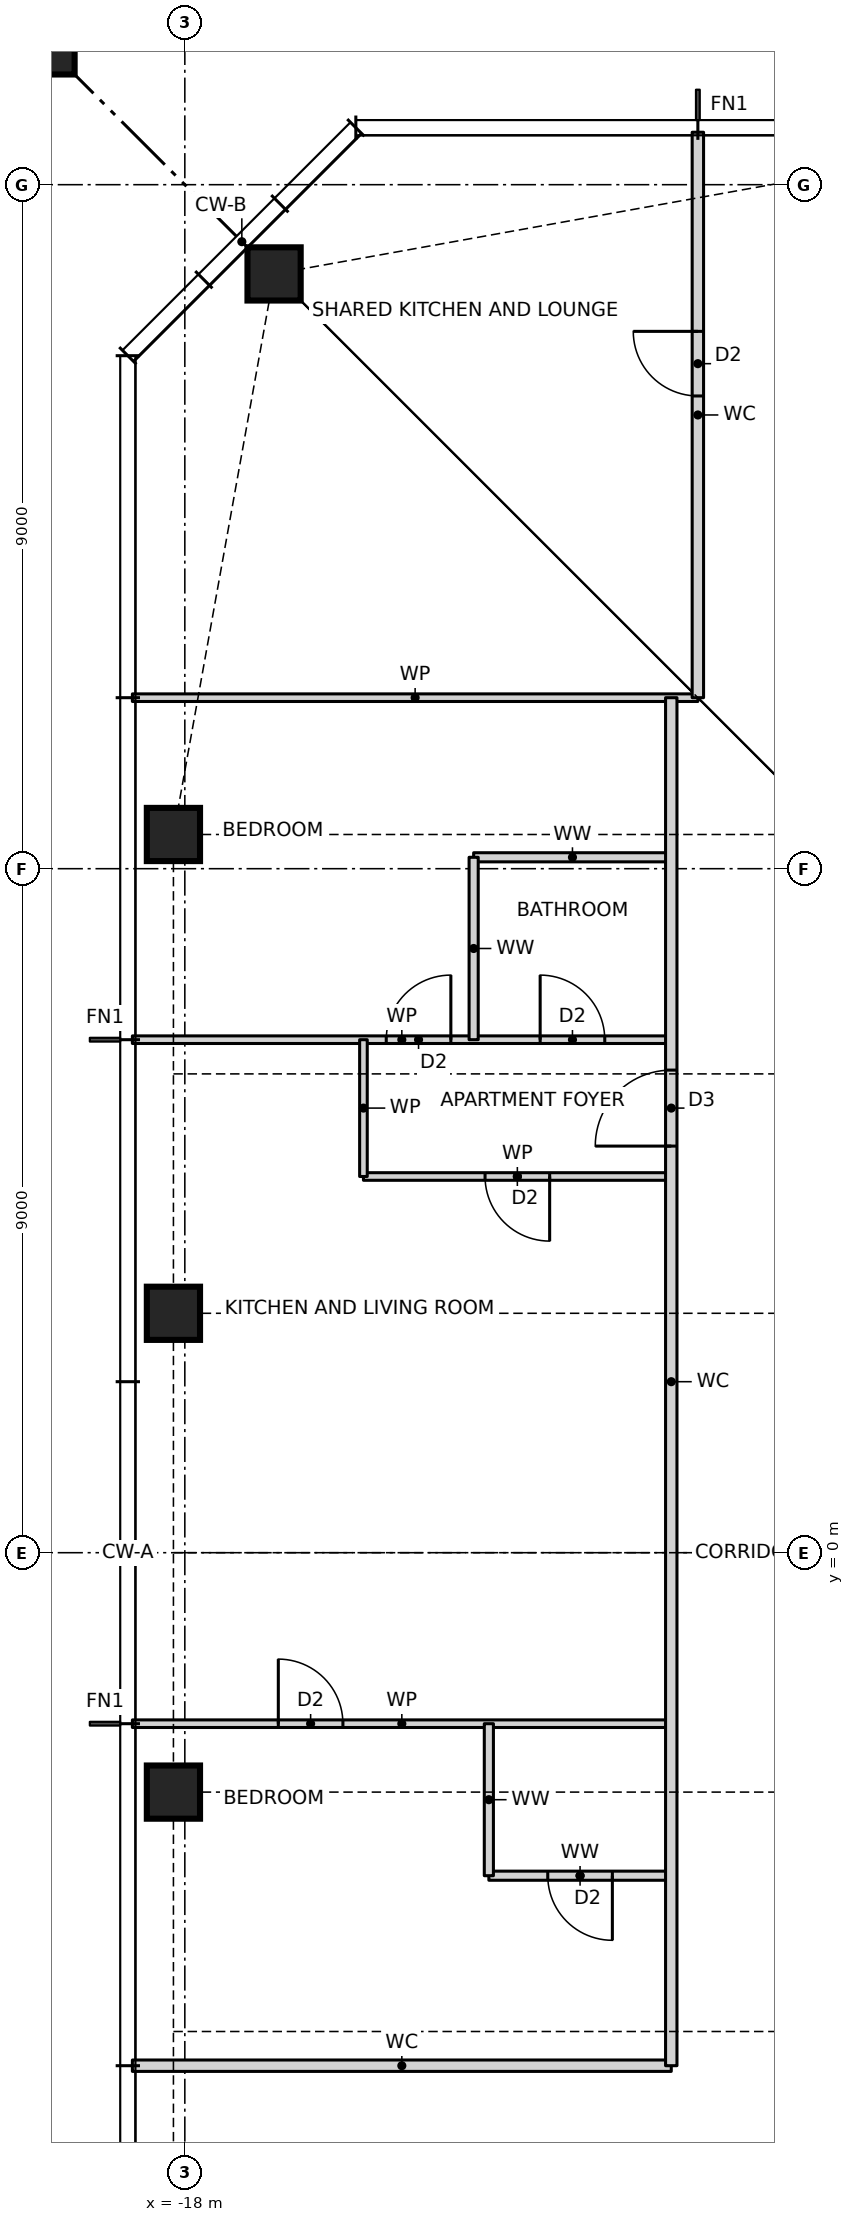
"""IFC4 building model, lengths in metres.
Left out: names, types, materials, properties, quantities, classifications, styles, units other than length and angle.
Written with IfcOpenShell. Run it as: python <this file> out.ifc"""

import sys

from ifc_helpers import new_model, si_unit, direction, frame, frame_2d, origin, origin_2d, place, context, subcontext, project, spatial, rectangle, hollow_rectangle, i_section, extrude, element, fill, save


model = new_model("IFC4")
c1 = context("Model", 3, precision=1e-05, world=origin(), true_north=direction((0.0, 1.0)))
c2 = subcontext(c1, "Body", "Model", "MODEL_VIEW")
j1 = project(units=[si_unit("LENGTHUNIT", "METRE"), si_unit("PLANEANGLEUNIT", "RADIAN")], contexts=[c1])
p1 = place(None, origin())
s1 = spatial("IfcSite", under=j1, at=p1, CompositionType="ELEMENT")
p2 = place(p1, origin())
s2 = spatial("IfcBuilding", under=s1, at=p2, CompositionType="ELEMENT")
p3 = place(p2, frame((0.0, 0.0, 174.0)))
s3 = spatial("IfcBuildingStorey", under=s2, at=p3, CompositionType="ELEMENT", Elevation=174.0)
for number, where, z_axis, x_axis in (
    (1, (-16.826, 16.826, 0.0), (0.0, 0.0, 1.0), (1.0, 0.0, 0.0)),
    (2, (-18.15, 9.45, 0.0), (0.0, 0.0, 1.0), (1.0, 0.0, 0.0)),
    (3, (-18.15, 3.15, 0.0), (0.0, 0.0, 1.0), (1.0, 0.0, 0.0)),
    (4, (-18.15, -3.15, 0.0), (0.0, 0.0, 1.0), (1.0, 0.0, 0.0)),
):
    element("IfcColumn", number, at=place(p3, frame(where, z_axis=z_axis, x_axis=x_axis)), inside=s3, PredefinedType="COLUMN", context=c2, shape_type="SweptSolid", body=[
        extrude(hollow_rectangle(XDim=0.7, YDim=0.7, WallThickness=0.06, at=origin_2d()), origin(), (0.0, 0.0, 1.0), 3.5),
    ])
p4 = place(p3, frame((-21.65, 21.65, 0.0), z_axis=(0.0, 0.0, 1.0), x_axis=(1.0, 0.0, 0.0)))
e5 = element("IfcColumn", 5, at=p4, inside=s3, PredefinedType="COLUMN", context=c2, shape_type="SweptSolid", body=[
    extrude(rectangle(XDim=4.4, YDim=4.4, at=origin_2d()), origin(), (0.0, 0.0, 1.0), 3.5),
    extrude(i_section(OverallWidth=0.478, OverallDepth=0.599, WebThickness=0.1, FlangeThickness=0.14, at=origin_2d()), origin(), (0.0, 0.0, 1.0), 3.5),
])
p5 = place(p3, frame((-18.69, -6.75, 0.0), z_axis=(0.0, 0.0, 1.0), x_axis=(1.0, 0.0, 0.0)))
e6 = element("IfcWall", 6, at=p5, inside=s3, PredefinedType="PARTITIONING", context=c2, shape_type="SweptSolid", body=[
    extrude(rectangle(XDim=7.09, YDim=0.15, at=frame_2d((3.545, 0.0))), origin(), (0.0, 0.0, 1.0), 3.27),
])
p6 = place(p3, frame((-14.0, -4.25, 0.0), z_axis=(0.0, 0.0, 1.0), x_axis=(1.0, 0.0, 0.0)))
e7 = element("IfcWall", 7, at=p6, inside=s3, PredefinedType="PARTITIONING", context=c2, shape_type="SweptSolid", body=[
    extrude(rectangle(XDim=2.4, YDim=0.12, at=frame_2d((1.2, 0.0))), origin(), (0.0, 0.0, 1.0), 3.27),
])
p7 = place(p6, frame((0.775, 0.0, 0.0)))
e8 = element("IfcOpeningElement", 8, at=p7, cuts=e7, PredefinedType="OPENING", context=c2, shape_type="SweptSolid", body=[
    extrude(rectangle(XDim=0.85, YDim=2.1, at=frame_2d((0.425, 1.05))), frame((0.0, 0.07, 0.0), z_axis=(0.0, -1.0, 0.0), x_axis=(1.0, 0.0, 0.0)), (0.0, 0.0, 1.0), 0.14),
])
p8 = place(p3, frame((-18.69, -2.25, 0.0), z_axis=(0.0, 0.0, 1.0), x_axis=(1.0, 0.0, 0.0)))
e9 = element("IfcWall", 9, at=p8, inside=s3, PredefinedType="PARTITIONING", context=c2, shape_type="SweptSolid", body=[
    extrude(rectangle(XDim=7.09, YDim=0.1, at=frame_2d((3.545, 0.0))), origin(), (0.0, 0.0, 1.0), 3.27),
])
p9 = place(p8, frame((1.92, 0.0, 0.0)))
e10 = element("IfcOpeningElement", 10, at=p9, cuts=e9, PredefinedType="OPENING", context=c2, shape_type="SweptSolid", body=[
    extrude(rectangle(XDim=0.85, YDim=2.1, at=frame_2d((0.425, 1.05))), frame((0.0, 0.06, 0.0), z_axis=(0.0, -1.0, 0.0), x_axis=(1.0, 0.0, 0.0)), (0.0, 0.0, 1.0), 0.12),
])
p10 = place(p3, frame((-15.65, 4.95, 0.0), z_axis=(0.0, 0.0, 1.0), x_axis=(1.0, 0.0, 0.0)))
e11 = element("IfcWall", 11, at=p10, inside=s3, PredefinedType="PARTITIONING", context=c2, shape_type="SweptSolid", body=[
    extrude(rectangle(XDim=4.05, YDim=0.1, at=frame_2d((2.025, 0.0))), origin(), (0.0, 0.0, 1.0), 3.27),
])
p11 = place(p10, frame((1.6, 0.0, 0.0)))
e12 = element("IfcOpeningElement", 12, at=p11, cuts=e11, PredefinedType="OPENING", context=c2, shape_type="SweptSolid", body=[
    extrude(rectangle(XDim=0.85, YDim=2.1, at=frame_2d((0.425, 1.05))), frame((0.0, 0.06, 0.0), z_axis=(0.0, -1.0, 0.0), x_axis=(1.0, 0.0, 0.0)), (0.0, 0.0, 1.0), 0.12),
])
p12 = place(p3, frame((-18.69, 6.75, 0.0), z_axis=(0.0, 0.0, 1.0), x_axis=(1.0, 0.0, 0.0)))
e13 = element("IfcWall", 13, at=p12, inside=s3, PredefinedType="PARTITIONING", context=c2, shape_type="SweptSolid", body=[
    extrude(rectangle(XDim=7.09, YDim=0.1, at=frame_2d((3.545, 0.0))), origin(), (0.0, 0.0, 1.0), 3.27),
])
p13 = place(p12, frame((3.34, 0.0, 0.0)))
e14 = element("IfcOpeningElement", 14, at=p13, cuts=e13, PredefinedType="OPENING", context=c2, shape_type="SweptSolid", body=[
    extrude(rectangle(XDim=0.85, YDim=2.1, at=frame_2d((0.425, 1.05))), frame((0.0, 0.06, 0.0), z_axis=(0.0, -1.0, 0.0), x_axis=(1.0, 0.0, 0.0)), (0.0, 0.0, 1.0), 0.12),
])
p14 = place(p12, frame((5.365, 0.0, 0.0)))
e15 = element("IfcOpeningElement", 15, at=p14, cuts=e13, PredefinedType="OPENING", context=c2, shape_type="SweptSolid", body=[
    extrude(rectangle(XDim=0.85, YDim=2.1, at=frame_2d((0.425, 1.05))), frame((0.0, 0.06, 0.0), z_axis=(0.0, -1.0, 0.0), x_axis=(1.0, 0.0, 0.0)), (0.0, 0.0, 1.0), 0.12),
])
p15 = place(p3, frame((-14.2, 9.15, 0.0), z_axis=(0.0, 0.0, 1.0), x_axis=(1.0, 0.0, 0.0)))
e16 = element("IfcWall", 16, at=p15, inside=s3, PredefinedType="PARTITIONING", context=c2, shape_type="SweptSolid", body=[
    extrude(rectangle(XDim=2.6, YDim=0.12, at=frame_2d((1.3, 0.0))), origin(), (0.0, 0.0, 1.0), 3.27),
])
p16 = place(p3, frame((-18.69, 11.25, 0.0), z_axis=(0.0, 0.0, 1.0), x_axis=(1.0, 0.0, 0.0)))
e17 = element("IfcWall", 17, at=p16, inside=s3, PredefinedType="PARTITIONING", context=c2, shape_type="SweptSolid", body=[
    extrude(rectangle(XDim=7.44, YDim=0.1, at=frame_2d((3.72, 0.0))), origin(), (0.0, 0.0, 1.0), 3.27),
])
p17 = place(p3, frame((-11.25, 11.25, 0.0), z_axis=(0.0, 0.0, 1.0), x_axis=(0.0, 1.0, 0.0)))
e18 = element("IfcWall", 18, at=p17, inside=s3, PredefinedType="PARTITIONING", context=c2, shape_type="SweptSolid", body=[
    extrude(rectangle(XDim=7.44, YDim=0.15, at=frame_2d((3.72, 0.0))), origin(), (0.0, 0.0, 1.0), 3.27),
])
p18 = place(p17, frame((3.97, 0.0, 0.0)))
e19 = element("IfcOpeningElement", 19, at=p18, cuts=e18, PredefinedType="OPENING", context=c2, shape_type="SweptSolid", body=[
    extrude(rectangle(XDim=0.85, YDim=2.1, at=frame_2d((0.425, 1.05))), frame((0.0, 0.085, 0.0), z_axis=(0.0, -1.0, 0.0), x_axis=(1.0, 0.0, 0.0)), (0.0, 0.0, 1.0), 0.17),
])
p19 = place(p3, frame((-11.6, -6.75, 0.0), z_axis=(0.0, 0.0, 1.0), x_axis=(0.0, 1.0, 0.0)))
e20 = element("IfcWall", 20, at=p19, inside=s3, PredefinedType="PARTITIONING", context=c2, shape_type="SweptSolid", body=[
    extrude(rectangle(XDim=18.0, YDim=0.15, at=frame_2d((9.0, 0.0))), origin(), (0.0, 0.0, 1.0), 3.27),
])
p20 = place(p19, frame((12.1, 0.0, 0.0)))
e21 = element("IfcOpeningElement", 21, at=p20, cuts=e20, PredefinedType="OPENING", context=c2, shape_type="SweptSolid", body=[
    extrude(rectangle(XDim=1.0, YDim=2.1, at=frame_2d((0.5, 1.05))), frame((0.0, 0.085, 0.0), z_axis=(0.0, -1.0, 0.0), x_axis=(1.0, 0.0, 0.0)), (0.0, 0.0, 1.0), 0.17),
])
p21 = place(p3, frame((-14.0, -4.25, 0.0), z_axis=(0.0, 0.0, 1.0), x_axis=(0.0, 1.0, 0.0)))
e22 = element("IfcWall", 22, at=p21, inside=s3, PredefinedType="PARTITIONING", context=c2, shape_type="SweptSolid", body=[
    extrude(rectangle(XDim=2.0, YDim=0.12, at=frame_2d((1.0, 0.0))), origin(), (0.0, 0.0, 1.0), 3.27),
])
p22 = place(p3, frame((-14.2, 6.75, 0.0), z_axis=(0.0, 0.0, 1.0), x_axis=(0.0, 1.0, 0.0)))
e23 = element("IfcWall", 23, at=p22, inside=s3, PredefinedType="PARTITIONING", context=c2, shape_type="SweptSolid", body=[
    extrude(rectangle(XDim=2.4, YDim=0.12, at=frame_2d((1.2, 0.0))), origin(), (0.0, 0.0, 1.0), 3.27),
])
p23 = place(p3, frame((-15.65, 4.95, 0.0), z_axis=(0.0, 0.0, 1.0), x_axis=(0.0, 1.0, 0.0)))
e24 = element("IfcWall", 24, at=p23, inside=s3, PredefinedType="PARTITIONING", context=c2, shape_type="SweptSolid", body=[
    extrude(rectangle(XDim=1.8, YDim=0.1, at=frame_2d((0.9, 0.0))), origin(), (0.0, 0.0, 1.0), 3.27),
])
p24 = place(p20, origin())
e25 = element("IfcDoor", 25, at=p24, inside=s3, OperationType="SINGLE_SWING_LEFT", PredefinedType="DOOR", context=c2, shape_type="SweptSolid", body=[
    extrude(rectangle(XDim=1.0, YDim=2.1, at=frame_2d((0.5, 1.05))), frame((0.0, 0.025, 0.0), z_axis=(0.0, -1.0, 0.0), x_axis=(1.0, 0.0, 0.0)), (0.0, 0.0, 1.0), 0.05),
])
fill(e21, e25)
p25 = place(p11, frame((0.85, 0.0, 0.0), z_axis=(0.0, 0.0, 1.0), x_axis=(-1.0, 0.0, 0.0)))
e26 = element("IfcDoor", 26, at=p25, inside=s3, OperationType="SINGLE_SWING_LEFT", PredefinedType="DOOR", context=c2, shape_type="SweptSolid", body=[
    extrude(rectangle(XDim=0.85, YDim=2.1, at=frame_2d((0.425, 1.05))), frame((0.0, 0.025, 0.0), z_axis=(0.0, -1.0, 0.0), x_axis=(1.0, 0.0, 0.0)), (0.0, 0.0, 1.0), 0.05),
])
fill(e12, e26)
p26 = place(p13, origin())
e27 = element("IfcDoor", 27, at=p26, inside=s3, OperationType="SINGLE_SWING_RIGHT", PredefinedType="DOOR", context=c2, shape_type="SweptSolid", body=[
    extrude(rectangle(XDim=0.85, YDim=2.1, at=frame_2d((0.425, 1.05))), frame((0.0, 0.025, 0.0), z_axis=(0.0, -1.0, 0.0), x_axis=(1.0, 0.0, 0.0)), (0.0, 0.0, 1.0), 0.05),
])
fill(e14, e27)
p27 = place(p14, origin())
e28 = element("IfcDoor", 28, at=p27, inside=s3, OperationType="SINGLE_SWING_LEFT", PredefinedType="DOOR", context=c2, shape_type="SweptSolid", body=[
    extrude(rectangle(XDim=0.85, YDim=2.1, at=frame_2d((0.425, 1.05))), frame((0.0, 0.025, 0.0), z_axis=(0.0, -1.0, 0.0), x_axis=(1.0, 0.0, 0.0)), (0.0, 0.0, 1.0), 0.05),
])
fill(e15, e28)
p28 = place(p9, origin())
e29 = element("IfcDoor", 29, at=p28, inside=s3, OperationType="SINGLE_SWING_LEFT", PredefinedType="DOOR", context=c2, shape_type="SweptSolid", body=[
    extrude(rectangle(XDim=0.85, YDim=2.1, at=frame_2d((0.425, 1.05))), frame((0.0, 0.025, 0.0), z_axis=(0.0, -1.0, 0.0), x_axis=(1.0, 0.0, 0.0)), (0.0, 0.0, 1.0), 0.05),
])
fill(e10, e29)
p29 = place(p7, frame((0.85, 0.0, 0.0), z_axis=(0.0, 0.0, 1.0), x_axis=(-1.0, 0.0, 0.0)))
e30 = element("IfcDoor", 30, at=p29, inside=s3, OperationType="SINGLE_SWING_LEFT", PredefinedType="DOOR", context=c2, shape_type="SweptSolid", body=[
    extrude(rectangle(XDim=0.85, YDim=2.1, at=frame_2d((0.425, 1.05))), frame((0.0, 0.025, 0.0), z_axis=(0.0, -1.0, 0.0), x_axis=(1.0, 0.0, 0.0)), (0.0, 0.0, 1.0), 0.05),
])
fill(e8, e30)
p30 = place(p18, origin())
e31 = element("IfcDoor", 31, at=p30, inside=s3, OperationType="SINGLE_SWING_RIGHT", PredefinedType="DOOR", context=c2, shape_type="SweptSolid", body=[
    extrude(rectangle(XDim=0.85, YDim=2.1, at=frame_2d((0.425, 1.05))), frame((0.0, 0.025, 0.0), z_axis=(0.0, -1.0, 0.0), x_axis=(1.0, 0.0, 0.0)), (0.0, 0.0, 1.0), 0.05),
])
fill(e19, e31)
save(model, sys.argv[1])
